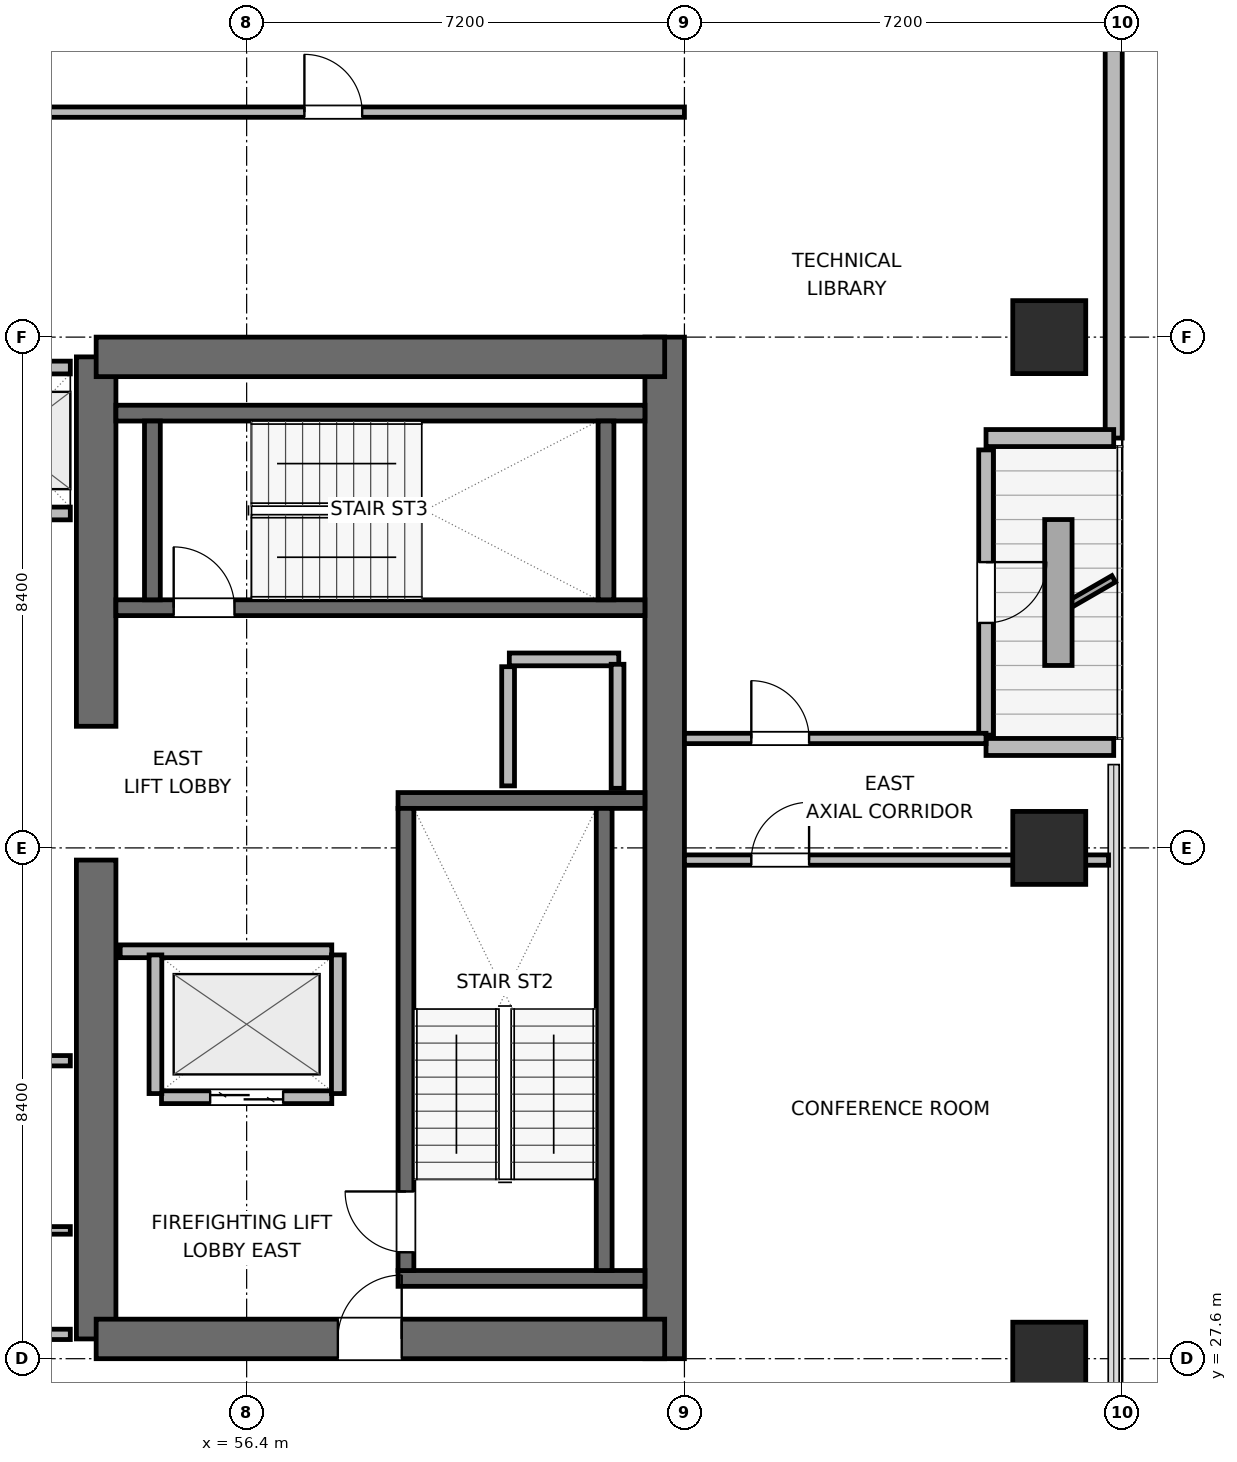
"""IFC4 building model, lengths in metres.
Left out: names, types, materials, properties, quantities, classifications, styles, units other than length and angle.
Written with IfcOpenShell. Run it as: python <this file> out.ifc"""

import sys

from ifc_helpers import new_model, si_unit, direction, frame, frame_2d, origin, origin_2d, place, context, subcontext, project, spatial, rectangle, extrude, element, fill, save


model = new_model("IFC4")
c1 = context("Model", 3, precision=1e-05, world=origin(), true_north=direction((0.0, 1.0)))
c2 = subcontext(c1, "Body", "Model", "MODEL_VIEW")
j1 = project(units=[si_unit("LENGTHUNIT", "METRE"), si_unit("PLANEANGLEUNIT", "RADIAN")], contexts=[c1])
p1 = place(None, origin())
s1 = spatial("IfcSite", under=j1, at=p1, CompositionType="ELEMENT")
p2 = place(p1, origin())
s2 = spatial("IfcBuilding", under=s1, at=p2, CompositionType="ELEMENT")
p3 = place(p2, frame((0.0, 0.0, 205.8)))
s3 = spatial("IfcBuildingStorey", under=s2, at=p3, CompositionType="ELEMENT", Elevation=205.8)
p4 = place(p3, frame((53.925, 27.925, 0.0), z_axis=(0.0, 0.0, 1.0), x_axis=(0.0, 1.0, 0.0)))
e1 = element("IfcWall", 1, at=p4, inside=s3, PredefinedType="SHEAR", context=c2, shape_type="SweptSolid", body=[
    extrude(rectangle(XDim=7.875, YDim=0.65, at=frame_2d((3.938, 0.0))), origin(), (0.0, 0.0, 1.0), 3.9),
])
p5 = place(p3, frame((53.925, 38.0, 0.0), z_axis=(0.0, 0.0, 1.0), x_axis=(0.0, 1.0, 0.0)))
e2 = element("IfcWall", 2, at=p5, inside=s3, PredefinedType="SHEAR", context=c2, shape_type="SweptSolid", body=[
    extrude(rectangle(XDim=6.075, YDim=0.65, at=frame_2d((3.038, 0.0))), origin(), (0.0, 0.0, 1.0), 3.9),
])
p6 = place(p3, frame((63.275, 27.6, 0.0), z_axis=(0.0, 0.0, 1.0), x_axis=(0.0, 1.0, 0.0)))
e3 = element("IfcWall", 3, at=p6, inside=s3, PredefinedType="SHEAR", context=c2, shape_type="SweptSolid", body=[
    extrude(rectangle(XDim=16.8, YDim=0.65, at=frame_2d((8.4, 0.0))), origin(), (0.0, 0.0, 1.0), 3.9),
])
p7 = place(p3, frame((53.925, 27.925, 0.0), z_axis=(0.0, 0.0, 1.0), x_axis=(1.0, 0.0, 0.0)))
e4 = element("IfcWall", 4, at=p7, inside=s3, PredefinedType="SHEAR", context=c2, shape_type="SweptSolid", body=[
    extrude(rectangle(XDim=9.35, YDim=0.65, at=frame_2d((4.675, 0.0))), origin(), (0.0, 0.0, 1.0), 3.9),
])
p8 = place(p7, frame((3.975, 0.0, 0.0)))
e5 = element("IfcOpeningElement", 5, at=p8, cuts=e4, PredefinedType="OPENING", context=c2, shape_type="SweptSolid", body=[
    extrude(rectangle(XDim=1.05, YDim=2.04, at=frame_2d((0.525, 1.02))), frame((0.0, 0.335, 0.0), z_axis=(0.0, -1.0, 0.0), x_axis=(1.0, 0.0, 0.0)), (0.0, 0.0, 1.0), 0.67),
])
p9 = place(p3, frame((53.925, 44.075, 0.0), z_axis=(0.0, 0.0, 1.0), x_axis=(1.0, 0.0, 0.0)))
e6 = element("IfcWall", 6, at=p9, inside=s3, PredefinedType="SHEAR", context=c2, shape_type="SweptSolid", body=[
    extrude(rectangle(XDim=9.35, YDim=0.65, at=frame_2d((4.675, 0.0))), origin(), (0.0, 0.0, 1.0), 3.9),
])
for number, where, z_axis, x_axis in (
    (7, (58.89, 28.92, 0.0), (0.0, 0.0, 1.0), (1.0, 0.0, 0.0)),
    (8, (58.89, 36.78, 0.0), (0.0, 0.0, 1.0), (1.0, 0.0, 0.0)),
):
    element("IfcWall", number, at=place(p3, frame(where, z_axis=z_axis, x_axis=x_axis)), inside=s3, PredefinedType="SHEAR", context=c2, shape_type="SweptSolid", body=[
        extrude(rectangle(XDim=4.06, YDim=0.26, at=frame_2d((2.03, 0.0))), origin(), (0.0, 0.0, 1.0), 3.9),
    ])
p10 = place(p3, frame((59.02, 29.05, 0.0), z_axis=(0.0, 0.0, 1.0), x_axis=(0.0, 1.0, 0.0)))
e9 = element("IfcWall", 9, at=p10, inside=s3, PredefinedType="SHEAR", context=c2, shape_type="SweptSolid", body=[
    extrude(rectangle(XDim=7.6, YDim=0.26, at=frame_2d((3.8, 0.0))), origin(), (0.0, 0.0, 1.0), 3.9),
])
p11 = place(p10, frame((0.3, 0.0, 0.0)))
e10 = element("IfcOpeningElement", 10, at=p11, cuts=e9, PredefinedType="OPENING", context=c2, shape_type="SweptSolid", body=[
    extrude(rectangle(XDim=1.0, YDim=2.04, at=frame_2d((0.5, 1.02))), frame((0.0, 0.14, 0.0), z_axis=(0.0, -1.0, 0.0), x_axis=(1.0, 0.0, 0.0)), (0.0, 0.0, 1.0), 0.28),
])
p12 = place(p3, frame((62.28, 29.05, 0.0), z_axis=(0.0, 0.0, 1.0), x_axis=(0.0, 1.0, 0.0)))
e11 = element("IfcWall", 11, at=p12, inside=s3, PredefinedType="SHEAR", context=c2, shape_type="SweptSolid", body=[
    extrude(rectangle(XDim=7.6, YDim=0.26, at=frame_2d((3.8, 0.0))), origin(), (0.0, 0.0, 1.0), 3.9),
])
p13 = place(p3, frame((54.25, 39.95, 0.0), z_axis=(0.0, 0.0, 1.0), x_axis=(1.0, 0.0, 0.0)))
e12 = element("IfcWall", 12, at=p13, inside=s3, PredefinedType="SHEAR", context=c2, shape_type="SweptSolid", body=[
    extrude(rectangle(XDim=8.7, YDim=0.26, at=frame_2d((4.35, 0.0))), origin(), (0.0, 0.0, 1.0), 3.9),
])
p14 = place(p13, frame((0.95, 0.0, 0.0)))
e13 = element("IfcOpeningElement", 13, at=p14, cuts=e12, PredefinedType="OPENING", context=c2, shape_type="SweptSolid", body=[
    extrude(rectangle(XDim=1.0, YDim=2.04, at=frame_2d((0.5, 1.02))), frame((0.0, 0.14, 0.0), z_axis=(0.0, -1.0, 0.0), x_axis=(1.0, 0.0, 0.0)), (0.0, 0.0, 1.0), 0.28),
])
p15 = place(p3, frame((54.25, 43.15, 0.0), z_axis=(0.0, 0.0, 1.0), x_axis=(1.0, 0.0, 0.0)))
e14 = element("IfcWall", 14, at=p15, inside=s3, PredefinedType="SHEAR", context=c2, shape_type="SweptSolid", body=[
    extrude(rectangle(XDim=8.7, YDim=0.26, at=frame_2d((4.35, 0.0))), origin(), (0.0, 0.0, 1.0), 3.9),
])
for number, where, z_axis, x_axis in (
    (15, (54.85, 40.08, 0.0), (0.0, 0.0, 1.0), (0.0, 1.0, 0.0)),
    (16, (62.31, 40.08, 0.0), (0.0, 0.0, 1.0), (0.0, 1.0, 0.0)),
):
    element("IfcWall", number, at=place(p3, frame(where, z_axis=z_axis, x_axis=x_axis)), inside=s3, PredefinedType="SHEAR", context=c2, shape_type="SweptSolid", body=[
        extrude(rectangle(XDim=2.94, YDim=0.26, at=frame_2d((1.47, 0.0))), origin(), (0.0, 0.0, 1.0), 3.9),
    ])
for number, where, z_axis, x_axis in (
    (17, (69.6, 27.6, 0.0), (0.0, 0.0, 1.0), (1.0, 0.0, 0.0)),
    (18, (69.6, 36.0, 0.0), (0.0, 0.0, 1.0), (1.0, 0.0, 0.0)),
    (19, (69.6, 44.4, 0.0), (0.0, 0.0, 1.0), (1.0, 0.0, 0.0)),
):
    element("IfcColumn", number, at=place(p3, frame(where, z_axis=z_axis, x_axis=x_axis)), inside=s3, PredefinedType="COLUMN", context=c2, shape_type="SweptSolid", body=[
        extrude(rectangle(XDim=1.2, YDim=1.2, at=origin_2d()), origin(), (0.0, 0.0, 1.0), 3.9),
    ])
p16 = place(p3, frame((70.66, 56.982, 0.0), z_axis=(0.0, 0.0, 1.0), x_axis=(0.0, -1.0, 0.0)))
e20 = element("IfcWall", 20, at=p16, inside=s3, PredefinedType="SOLIDWALL", context=c2, shape_type="SweptSolid", body=[
    extrude(rectangle(XDim=14.242, YDim=0.28, at=frame_2d((7.121, 0.0))), origin(), (0.0, 0.0, 1.0), 3.6),
])
p17 = place(p3, frame((70.66, 42.74, 0.0), z_axis=(0.0, 0.0, 1.0), x_axis=(-1.0, 0.0, 0.0)))
e21 = element("IfcWall", 21, at=p17, inside=s3, PredefinedType="SOLIDWALL", context=c2, shape_type="SweptSolid", body=[
    extrude(rectangle(XDim=2.1, YDim=0.28, at=frame_2d((1.05, 0.0))), origin(), (0.0, 0.0, 1.0), 2.135),
])
p18 = place(p3, frame((68.56, 42.545, 0.0), z_axis=(0.0, 0.0, 1.0), x_axis=(0.0, -1.0, 0.0)))
e22 = element("IfcWall", 22, at=p18, inside=s3, PredefinedType="SOLIDWALL", context=c2, shape_type="SweptSolid", body=[
    extrude(rectangle(XDim=4.69, YDim=0.24, at=frame_2d((2.345, 0.0))), origin(), (0.0, 0.0, 1.0), 3.168),
])
p19 = place(p18, frame((1.845, 0.0, 0.0)))
e23 = element("IfcOpeningElement", 23, at=p19, cuts=e22, PredefinedType="OPENING", context=c2, shape_type="SweptSolid", body=[
    extrude(rectangle(XDim=1.0, YDim=2.02, at=frame_2d((0.5, 1.01))), frame((0.0, 0.13, 0.0), z_axis=(0.0, -1.0, 0.0), x_axis=(1.0, 0.0, 0.0)), (0.0, 0.0, 1.0), 0.26),
])
p20 = place(p3, frame((68.56, 37.66, 0.0), z_axis=(0.0, 0.0, 1.0), x_axis=(1.0, 0.0, 0.0)))
e24 = element("IfcWall", 24, at=p20, inside=s3, PredefinedType="SOLIDWALL", context=c2, shape_type="SweptSolid", body=[
    extrude(rectangle(XDim=2.1, YDim=0.28, at=frame_2d((1.05, 0.0))), origin(), (0.0, 0.0, 1.0), 2.135),
])
p21 = place(p3, frame((60.72, 39.1, 0.0), z_axis=(0.0, 0.0, 1.0), x_axis=(1.0, 0.0, 0.0)))
e25 = element("IfcWall", 25, at=p21, inside=s3, PredefinedType="PARTITIONING", context=c2, shape_type="SweptSolid", body=[
    extrude(rectangle(XDim=1.8, YDim=0.21, at=frame_2d((0.9, 0.0))), origin(), (0.0, 0.0, 1.0), 3.6),
])
p22 = place(p3, frame((60.7, 37.02, 0.0), z_axis=(0.0, 0.0, 1.0), x_axis=(0.0, 1.0, 0.0)))
e26 = element("IfcWall", 26, at=p22, inside=s3, PredefinedType="PARTITIONING", context=c2, shape_type="SweptSolid", body=[
    extrude(rectangle(XDim=1.96, YDim=0.21, at=frame_2d((0.98, 0.0))), origin(), (0.0, 0.0, 1.0), 3.6),
])
p23 = place(p3, frame((62.5, 36.98, 0.0), z_axis=(0.0, 0.0, 1.0), x_axis=(0.0, 1.0, 0.0)))
e27 = element("IfcWall", 27, at=p23, inside=s3, PredefinedType="PARTITIONING", context=c2, shape_type="SweptSolid", body=[
    extrude(rectangle(XDim=2.04, YDim=0.21, at=frame_2d((1.02, 0.0))), origin(), (0.0, 0.0, 1.0), 3.6),
])
p24 = place(p3, frame((55.0, 31.9, 0.0), z_axis=(0.0, 0.0, 1.0), x_axis=(1.0, 0.0, 0.0)))
e28 = element("IfcWall", 28, at=p24, inside=s3, PredefinedType="PARTITIONING", context=c2, shape_type="SweptSolid", body=[
    extrude(rectangle(XDim=2.8, YDim=0.21, at=frame_2d((1.4, 0.0))), origin(), (0.0, 0.0, 1.0), 3.6),
])
p25 = place(p24, frame((0.8, 0.0, 0.0)))
e29 = element("IfcOpeningElement", 29, at=p25, cuts=e28, PredefinedType="OPENING", context=c2, shape_type="SweptSolid", body=[
    extrude(rectangle(XDim=1.2, YDim=2.04, at=frame_2d((0.6, 1.02))), frame((0.0, 0.115, 0.0), z_axis=(0.0, -1.0, 0.0), x_axis=(1.0, 0.0, 0.0)), (0.0, 0.0, 1.0), 0.23),
])
p26 = place(p3, frame((54.32, 34.3, 0.0), z_axis=(0.0, 0.0, 1.0), x_axis=(1.0, 0.0, 0.0)))
e30 = element("IfcWall", 30, at=p26, inside=s3, PredefinedType="PARTITIONING", context=c2, shape_type="SweptSolid", body=[
    extrude(rectangle(XDim=3.48, YDim=0.21, at=frame_2d((1.74, 0.0))), origin(), (0.0, 0.0, 1.0), 3.6),
])
for number, where, z_axis, x_axis in (
    (31, (54.9, 31.96, 0.0), (0.0, 0.0, 1.0), (0.0, 1.0, 0.0)),
    (32, (57.9, 31.96, 0.0), (0.0, 0.0, 1.0), (0.0, 1.0, 0.0)),
):
    element("IfcWall", number, at=place(p3, frame(where, z_axis=z_axis, x_axis=x_axis)), inside=s3, PredefinedType="PARTITIONING", context=c2, shape_type="SweptSolid", body=[
        extrude(rectangle(XDim=2.28, YDim=0.21, at=frame_2d((1.14, 0.0))), origin(), (0.0, 0.0, 1.0), 3.6),
    ])
p27 = place(p3, frame((51.4, 41.5, 0.0), z_axis=(0.0, 0.0, 1.0), x_axis=(1.0, 0.0, 0.0)))
e33 = element("IfcWall", 33, at=p27, inside=s3, PredefinedType="PARTITIONING", context=c2, shape_type="SweptSolid", body=[
    extrude(rectangle(XDim=2.1, YDim=0.21, at=frame_2d((1.05, 0.0))), origin(), (0.0, 0.0, 1.0), 3.6),
])
p28 = place(p27, frame((0.5, 0.0, 0.0)))
e34 = element("IfcOpeningElement", 34, at=p28, cuts=e33, PredefinedType="OPENING", context=c2, shape_type="SweptSolid", body=[
    extrude(rectangle(XDim=1.1, YDim=2.04, at=frame_2d((0.55, 1.02))), frame((0.0, 0.115, 0.0), z_axis=(0.0, -1.0, 0.0), x_axis=(1.0, 0.0, 0.0)), (0.0, 0.0, 1.0), 0.23),
])
p29 = place(p3, frame((51.4, 43.9, 0.0), z_axis=(0.0, 0.0, 1.0), x_axis=(1.0, 0.0, 0.0)))
e35 = element("IfcWall", 35, at=p29, inside=s3, PredefinedType="PARTITIONING", context=c2, shape_type="SweptSolid", body=[
    extrude(rectangle(XDim=2.1, YDim=0.21, at=frame_2d((1.05, 0.0))), origin(), (0.0, 0.0, 1.0), 2.685),
])
p30 = place(p3, frame((49.287, 28.0, 0.0), z_axis=(0.0, 0.0, 1.0), x_axis=(1.0, 0.0, 0.0)))
e36 = element("IfcWall", 36, at=p30, inside=s3, PredefinedType="PARTITIONING", context=c2, shape_type="SweptSolid", body=[
    extrude(rectangle(XDim=4.213, YDim=0.17, at=frame_2d((2.106, 0.0))), origin(), (0.0, 0.0, 1.0), 2.685),
])
p31 = place(p3, frame((52.2, 32.5, 0.0), z_axis=(0.0, 0.0, 1.0), x_axis=(1.0, 0.0, 0.0)))
e37 = element("IfcWall", 37, at=p31, inside=s3, PredefinedType="PARTITIONING", context=c2, shape_type="SweptSolid", body=[
    extrude(rectangle(XDim=1.3, YDim=0.17, at=frame_2d((0.65, 0.0))), origin(), (0.0, 0.0, 1.0), 3.6),
])
p32 = place(p3, frame((49.287, 29.71, 0.0), z_axis=(0.0, 0.0, 1.0), x_axis=(1.0, 0.0, 0.0)))
e38 = element("IfcWall", 38, at=p32, inside=s3, PredefinedType="PARTITIONING", context=c2, shape_type="SweptSolid", body=[
    extrude(rectangle(XDim=4.213, YDim=0.125, at=frame_2d((2.106, 0.0))), origin(), (0.0, 0.0, 1.0), 3.6),
])
p33 = place(p3, frame((28.975, 48.1, 0.0), z_axis=(0.0, 0.0, 1.0), x_axis=(1.0, 0.0, 0.0)))
e39 = element("IfcWall", 39, at=p33, inside=s3, PredefinedType="PARTITIONING", context=c2, shape_type="SweptSolid", body=[
    extrude(rectangle(XDim=34.625, YDim=0.17, at=frame_2d((17.312, 0.0))), origin(), (0.0, 0.0, 1.0), 3.6),
])
p34 = place(p33, frame((6.832, 0.0, 0.0)))
e40 = element("IfcOpeningElement", 40, at=p34, cuts=e39, PredefinedType="OPENING", context=c2, shape_type="SweptSolid", body=[
    extrude(rectangle(XDim=0.95, YDim=2.04, at=frame_2d((0.475, 1.02))), frame((0.0, 0.095, 0.0), z_axis=(0.0, -1.0, 0.0), x_axis=(1.0, 0.0, 0.0)), (0.0, 0.0, 1.0), 0.19),
])
p35 = place(p33, frame((17.245, 0.0, 0.0)))
e41 = element("IfcOpeningElement", 41, at=p35, cuts=e39, PredefinedType="OPENING", context=c2, shape_type="SweptSolid", body=[
    extrude(rectangle(XDim=0.95, YDim=2.04, at=frame_2d((0.475, 1.02))), frame((0.0, 0.095, 0.0), z_axis=(0.0, -1.0, 0.0), x_axis=(1.0, 0.0, 0.0)), (0.0, 0.0, 1.0), 0.19),
])
p36 = place(p33, frame((21.475, 0.0, 0.0)))
e42 = element("IfcOpeningElement", 42, at=p36, cuts=e39, PredefinedType="OPENING", context=c2, shape_type="SweptSolid", body=[
    extrude(rectangle(XDim=0.95, YDim=2.04, at=frame_2d((0.475, 1.02))), frame((0.0, 0.095, 0.0), z_axis=(0.0, -1.0, 0.0), x_axis=(1.0, 0.0, 0.0)), (0.0, 0.0, 1.0), 0.19),
])
p37 = place(p33, frame((28.375, 0.0, 0.0)))
e43 = element("IfcOpeningElement", 43, at=p37, cuts=e39, PredefinedType="OPENING", context=c2, shape_type="SweptSolid", body=[
    extrude(rectangle(XDim=0.95, YDim=2.04, at=frame_2d((0.475, 1.02))), frame((0.0, 0.095, 0.0), z_axis=(0.0, -1.0, 0.0), x_axis=(1.0, 0.0, 0.0)), (0.0, 0.0, 1.0), 0.19),
])
p38 = place(p3, frame((63.6, 35.8, 0.0), z_axis=(0.0, 0.0, 1.0), x_axis=(1.0, 0.0, 0.0)))
e44 = element("IfcWall", 44, at=p38, inside=s3, PredefinedType="PARTITIONING", context=c2, shape_type="SweptSolid", body=[
    extrude(rectangle(XDim=6.975, YDim=0.17, at=frame_2d((3.487, 0.0))), origin(), (0.0, 0.0, 1.0), 2.135),
])
p39 = place(p38, frame((1.1, 0.0, 0.0)))
e45 = element("IfcOpeningElement", 45, at=p39, cuts=e44, PredefinedType="OPENING", context=c2, shape_type="SweptSolid", body=[
    extrude(rectangle(XDim=0.95, YDim=2.04, at=frame_2d((0.475, 1.02))), frame((0.0, 0.095, 0.0), z_axis=(0.0, -1.0, 0.0), x_axis=(1.0, 0.0, 0.0)), (0.0, 0.0, 1.0), 0.19),
])
p40 = place(p3, frame((63.6, 37.8, 0.0), z_axis=(0.0, 0.0, 1.0), x_axis=(1.0, 0.0, 0.0)))
e46 = element("IfcWall", 46, at=p40, inside=s3, PredefinedType="PARTITIONING", context=c2, shape_type="SweptSolid", body=[
    extrude(rectangle(XDim=4.96, YDim=0.17, at=frame_2d((2.48, 0.0))), origin(), (0.0, 0.0, 1.0), 3.6),
])
p41 = place(p40, frame((1.1, 0.0, 0.0)))
e47 = element("IfcOpeningElement", 47, at=p41, cuts=e46, PredefinedType="OPENING", context=c2, shape_type="SweptSolid", body=[
    extrude(rectangle(XDim=0.95, YDim=2.04, at=frame_2d((0.475, 1.02))), frame((0.0, 0.095, 0.0), z_axis=(0.0, -1.0, 0.0), x_axis=(1.0, 0.0, 0.0)), (0.0, 0.0, 1.0), 0.19),
])
p42 = place(p19, origin())
e48 = element("IfcDoor", 48, at=p42, inside=s3, OperationType="SINGLE_SWING_LEFT", PredefinedType="DOOR", context=c2, shape_type="SweptSolid", body=[
    extrude(rectangle(XDim=1.0, YDim=2.02, at=frame_2d((0.5, 1.01))), frame((0.0, 0.025, 0.0), z_axis=(0.0, -1.0, 0.0), x_axis=(1.0, 0.0, 0.0)), (0.0, 0.0, 1.0), 0.05),
])
fill(e23, e48)
p43 = place(p11, origin())
e49 = element("IfcDoor", 49, at=p43, inside=s3, OperationType="SINGLE_SWING_RIGHT", PredefinedType="DOOR", context=c2, shape_type="SweptSolid", body=[
    extrude(rectangle(XDim=1.0, YDim=2.04, at=frame_2d((0.5, 1.02))), frame((0.0, 0.025, 0.0), z_axis=(0.0, -1.0, 0.0), x_axis=(1.0, 0.0, 0.0)), (0.0, 0.0, 1.0), 0.05),
])
fill(e10, e49)
p44 = place(p14, origin())
e50 = element("IfcDoor", 50, at=p44, inside=s3, OperationType="SINGLE_SWING_LEFT", PredefinedType="DOOR", context=c2, shape_type="SweptSolid", body=[
    extrude(rectangle(XDim=1.0, YDim=2.04, at=frame_2d((0.5, 1.02))), frame((0.0, 0.025, 0.0), z_axis=(0.0, -1.0, 0.0), x_axis=(1.0, 0.0, 0.0)), (0.0, 0.0, 1.0), 0.05),
])
fill(e13, e50)
p45 = place(p25, origin())
e51 = element("IfcDoor", 51, at=p45, inside=s3, OperationType="DOUBLE_DOOR_SLIDING", PredefinedType="DOOR", context=c2, shape_type="SweptSolid", body=[
    extrude(rectangle(XDim=1.2, YDim=2.04, at=frame_2d((0.6, 1.02))), frame((0.0, 0.025, 0.0), z_axis=(0.0, -1.0, 0.0), x_axis=(1.0, 0.0, 0.0)), (0.0, 0.0, 1.0), 0.05),
])
fill(e29, e51)
p46 = place(p8, origin())
e52 = element("IfcDoor", 52, at=p46, inside=s3, OperationType="SINGLE_SWING_RIGHT", PredefinedType="DOOR", context=c2, shape_type="SweptSolid", body=[
    extrude(rectangle(XDim=1.05, YDim=2.04, at=frame_2d((0.525, 1.02))), frame((0.0, 0.025, 0.0), z_axis=(0.0, -1.0, 0.0), x_axis=(1.0, 0.0, 0.0)), (0.0, 0.0, 1.0), 0.05),
])
fill(e5, e52)
p47 = place(p37, origin())
e53 = element("IfcDoor", 53, at=p47, inside=s3, OperationType="SINGLE_SWING_LEFT", PredefinedType="DOOR", context=c2, shape_type="SweptSolid", body=[
    extrude(rectangle(XDim=0.95, YDim=2.04, at=frame_2d((0.475, 1.02))), frame((0.0, 0.025, 0.0), z_axis=(0.0, -1.0, 0.0), x_axis=(1.0, 0.0, 0.0)), (0.0, 0.0, 1.0), 0.05),
])
fill(e43, e53)
p48 = place(p39, origin())
e54 = element("IfcDoor", 54, at=p48, inside=s3, OperationType="SINGLE_SWING_RIGHT", PredefinedType="DOOR", context=c2, shape_type="SweptSolid", body=[
    extrude(rectangle(XDim=0.95, YDim=2.04, at=frame_2d((0.475, 1.02))), frame((0.0, 0.025, 0.0), z_axis=(0.0, -1.0, 0.0), x_axis=(1.0, 0.0, 0.0)), (0.0, 0.0, 1.0), 0.05),
])
fill(e45, e54)
p49 = place(p41, origin())
e55 = element("IfcDoor", 55, at=p49, inside=s3, OperationType="SINGLE_SWING_LEFT", PredefinedType="DOOR", context=c2, shape_type="SweptSolid", body=[
    extrude(rectangle(XDim=0.95, YDim=2.04, at=frame_2d((0.475, 1.02))), frame((0.0, 0.025, 0.0), z_axis=(0.0, -1.0, 0.0), x_axis=(1.0, 0.0, 0.0)), (0.0, 0.0, 1.0), 0.05),
])
fill(e47, e55)
save(model, sys.argv[1])
